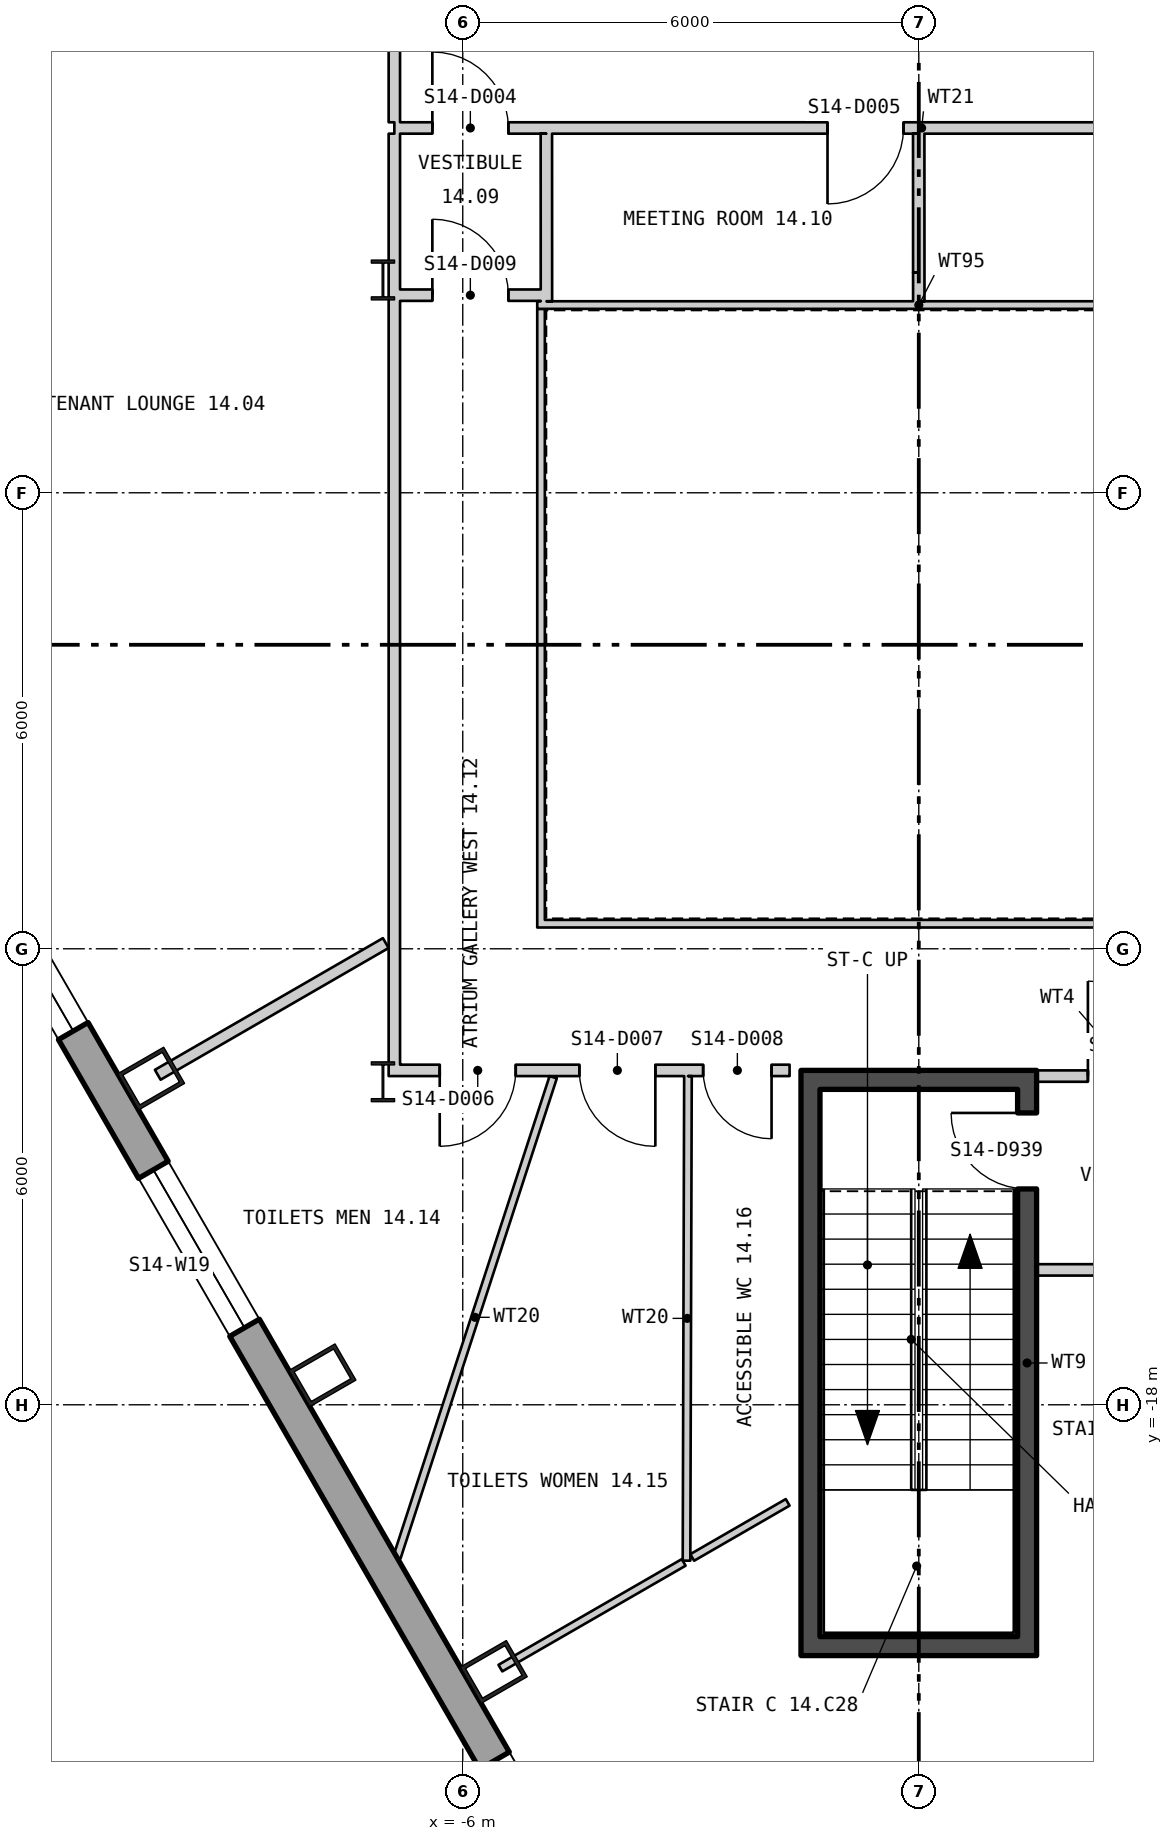
"""IFC4 building model, lengths in metres.
Left out: names, types, materials, properties, quantities, classifications, styles, units other than length and angle.
Written with IfcOpenShell. Run it as: python <this file> out.ifc"""

import sys

from ifc_helpers import new_model, si_unit, direction, frame, frame_2d, origin, origin_2d, place, context, subcontext, project, spatial, polyline, rectangle, hollow_rectangle, i_section, outline, extrude, element, fill, save


model = new_model("IFC4")
c1 = context("Model", 3, precision=1e-05, world=origin(), true_north=direction((0.0, 1.0)))
c2 = subcontext(c1, "Body", "Model", "MODEL_VIEW")
j1 = project(units=[si_unit("LENGTHUNIT", "METRE"), si_unit("PLANEANGLEUNIT", "RADIAN")], contexts=[c1])
p1 = place(None, origin())
s1 = spatial("IfcSite", under=j1, at=p1, CompositionType="ELEMENT")
p2 = place(p1, origin())
s2 = spatial("IfcBuilding", under=s1, at=p2, CompositionType="ELEMENT")
p3 = place(p2, frame((0.0, 0.0, 192.6)))
s3 = spatial("IfcBuildingStorey", under=s2, at=p3, CompositionType="ELEMENT", Elevation=192.6)
for number, where, z_axis, x_axis in (
    (1, (-10.1, -13.708, 0.0), (0.0, 0.0, 1.0), (0.5, -0.866, 0.0)),
    (2, (-7.846, -17.612, 0.0), (0.0, 0.0, 1.0), (0.5, -0.866, 0.0)),
    (3, (-5.592, -21.515, 0.0), (0.0, 0.0, 1.0), (0.5, -0.866, 0.0)),
):
    element("IfcColumn", number, at=place(p3, frame(where, z_axis=z_axis, x_axis=x_axis)), inside=s3, PredefinedType="COLUMN", context=c2, shape_type="SweptSolid", body=[
        extrude(hollow_rectangle(XDim=0.55, YDim=0.7, WallThickness=0.05, at=origin_2d()), origin(), (0.0, 0.0, 1.0), 3.9),
    ])
for number, where, z_axis, x_axis in (
    (4, (-7.05, -3.2, 0.0), (0.0, 0.0, 1.0), (1.0, 0.0, 0.0)),
    (5, (-7.05, -13.75, 0.0), (0.0, 0.0, 1.0), (1.0, 0.0, 0.0)),
):
    element("IfcColumn", number, at=place(p3, frame(where, z_axis=z_axis, x_axis=x_axis)), inside=s3, PredefinedType="COLUMN", context=c2, shape_type="SweptSolid", body=[
        extrude(i_section(OverallWidth=0.306, OverallDepth=0.524, WebThickness=0.021, FlangeThickness=0.04, at=origin_2d()), origin(), (0.0, 0.0, 1.0), 3.9),
    ])
p4 = place(p3, frame((-26.54, 13.618, -0.18), z_axis=(0.0, 0.0, 1.0), x_axis=(0.499999764979, -0.866025539474, 0.0)))
e6 = element("IfcWall", 6, at=p4, inside=s3, PredefinedType="SOLIDWALL", context=c2, shape_type="SweptSolid", body=[
    extrude(outline(polyline([(-0.13, -0.225), (45.87, -0.225), (45.61, 0.225), (0.13, 0.225), (-0.13, -0.225)])), origin(), (0.0, 0.0, 1.0), 3.68),
])
p5 = place(p4, frame((1.424, 0.0, 1.08)))
e7 = element("IfcOpeningElement", 7, at=p5, cuts=e6, PredefinedType="OPENING", context=c2, shape_type="SweptSolid", body=[
    extrude(rectangle(XDim=2.4, YDim=2.0, at=frame_2d((1.2, 1.0))), frame((0.0, 0.235, 0.0), z_axis=(0.0, -1.0, 0.0), x_axis=(1.0, 0.0, 0.0)), (0.0, 0.0, 1.0), 0.47),
])
p6 = place(p4, frame((5.893, 0.0, 1.08)))
e8 = element("IfcOpeningElement", 8, at=p6, cuts=e6, PredefinedType="OPENING", context=c2, shape_type="SweptSolid", body=[
    extrude(rectangle(XDim=2.4, YDim=2.0, at=frame_2d((1.2, 1.0))), frame((0.0, 0.235, 0.0), z_axis=(0.0, -1.0, 0.0), x_axis=(1.0, 0.0, 0.0)), (0.0, 0.0, 1.0), 0.47),
])
p7 = place(p4, frame((10.401, 0.0, 1.08)))
e9 = element("IfcOpeningElement", 9, at=p7, cuts=e6, PredefinedType="OPENING", context=c2, shape_type="SweptSolid", body=[
    extrude(rectangle(XDim=2.4, YDim=2.0, at=frame_2d((1.2, 1.0))), frame((0.0, 0.235, 0.0), z_axis=(0.0, -1.0, 0.0), x_axis=(1.0, 0.0, 0.0)), (0.0, 0.0, 1.0), 0.47),
])
p8 = place(p4, frame((14.909, 0.0, 1.08)))
e10 = element("IfcOpeningElement", 10, at=p8, cuts=e6, PredefinedType="OPENING", context=c2, shape_type="SweptSolid", body=[
    extrude(rectangle(XDim=2.4, YDim=2.0, at=frame_2d((1.2, 1.0))), frame((0.0, 0.235, 0.0), z_axis=(0.0, -1.0, 0.0), x_axis=(1.0, 0.0, 0.0)), (0.0, 0.0, 1.0), 0.47),
])
p9 = place(p4, frame((19.416, 0.0, 1.08)))
e11 = element("IfcOpeningElement", 11, at=p9, cuts=e6, PredefinedType="OPENING", context=c2, shape_type="SweptSolid", body=[
    extrude(rectangle(XDim=2.4, YDim=2.0, at=frame_2d((1.2, 1.0))), frame((0.0, 0.235, 0.0), z_axis=(0.0, -1.0, 0.0), x_axis=(1.0, 0.0, 0.0)), (0.0, 0.0, 1.0), 0.47),
])
p10 = place(p4, frame((23.924, 0.0, 1.08)))
e12 = element("IfcOpeningElement", 12, at=p10, cuts=e6, PredefinedType="OPENING", context=c2, shape_type="SweptSolid", body=[
    extrude(rectangle(XDim=2.4, YDim=2.0, at=frame_2d((1.2, 1.0))), frame((0.0, 0.235, 0.0), z_axis=(0.0, -1.0, 0.0), x_axis=(1.0, 0.0, 0.0)), (0.0, 0.0, 1.0), 0.47),
])
p11 = place(p4, frame((28.431, 0.0, 1.08)))
e13 = element("IfcOpeningElement", 13, at=p11, cuts=e6, PredefinedType="OPENING", context=c2, shape_type="SweptSolid", body=[
    extrude(rectangle(XDim=2.4, YDim=2.0, at=frame_2d((1.2, 1.0))), frame((0.0, 0.235, 0.0), z_axis=(0.0, -1.0, 0.0), x_axis=(1.0, 0.0, 0.0)), (0.0, 0.0, 1.0), 0.47),
])
p12 = place(p4, frame((32.939, 0.0, 1.08)))
e14 = element("IfcOpeningElement", 14, at=p12, cuts=e6, PredefinedType="OPENING", context=c2, shape_type="SweptSolid", body=[
    extrude(rectangle(XDim=2.4, YDim=2.0, at=frame_2d((1.2, 1.0))), frame((0.0, 0.235, 0.0), z_axis=(0.0, -1.0, 0.0), x_axis=(1.0, 0.0, 0.0)), (0.0, 0.0, 1.0), 0.47),
])
p13 = place(p4, frame((41.916, 0.0, 1.08)))
e15 = element("IfcOpeningElement", 15, at=p13, cuts=e6, PredefinedType="OPENING", context=c2, shape_type="SweptSolid", body=[
    extrude(rectangle(XDim=2.4, YDim=2.0, at=frame_2d((1.2, 1.0))), frame((0.0, 0.235, 0.0), z_axis=(0.0, -1.0, 0.0), x_axis=(1.0, 0.0, 0.0)), (0.0, 0.0, 1.0), 0.47),
])
for number, where, z_axis, x_axis in (
    (16, (-5.02, -11.67, 0.0), (0.0, 0.0, 1.0), (1.0, 0.0, 0.0)),
    (17, (5.02, -3.53, 0.0), (0.0, 0.0, 1.0), (-1.0, 0.0, 0.0)),
):
    element("IfcWall", number, at=place(p3, frame(where, z_axis=z_axis, x_axis=x_axis)), inside=s3, PredefinedType="PARTITIONING", context=c2, shape_type="SweptSolid", body=[
        extrude(rectangle(XDim=10.04, YDim=0.1, at=frame_2d((5.02, 0.0))), origin(), (0.0, 0.0, 1.0), 3.7),
    ])
p14 = place(p3, frame((-4.97, -3.58, 0.0), z_axis=(0.0, 0.0, 1.0), x_axis=(0.0, -1.0, 0.0)))
e18 = element("IfcWall", 18, at=p14, inside=s3, PredefinedType="PARTITIONING", context=c2, shape_type="SweptSolid", body=[
    extrude(rectangle(XDim=8.04, YDim=0.1, at=frame_2d((4.02, 0.0))), origin(), (0.0, 0.0, 1.0), 3.7),
])
p15 = place(p3, frame((-1.425, -21.05, 0.0), z_axis=(0.0, 0.0, 1.0), x_axis=(0.0, 1.0, 0.0)))
e19 = element("IfcWall", 19, at=p15, inside=s3, PredefinedType="SHEAR", context=c2, shape_type="SweptSolid", body=[
    extrude(rectangle(XDim=7.2, YDim=0.25, at=frame_2d((3.6, 0.0))), origin(), (0.0, 0.0, 1.0), 3.7),
])
p16 = place(p3, frame((1.425, -21.05, 0.0), z_axis=(0.0, 0.0, 1.0), x_axis=(0.0, 1.0, 0.0)))
e20 = element("IfcWall", 20, at=p16, inside=s3, PredefinedType="SHEAR", context=c2, shape_type="SweptSolid", body=[
    extrude(rectangle(XDim=7.2, YDim=0.25, at=frame_2d((3.6, 0.0))), origin(), (0.0, 0.0, 1.0), 3.7),
])
p17 = place(p16, frame((5.89, 0.0, 0.0)))
e21 = element("IfcOpeningElement", 21, at=p17, cuts=e20, PredefinedType="OPENING", context=c2, shape_type="SweptSolid", body=[
    extrude(rectangle(XDim=1.0, YDim=2.1, at=frame_2d((0.5, 1.05))), frame((0.0, 0.135, 0.0), z_axis=(0.0, -1.0, 0.0), x_axis=(1.0, 0.0, 0.0)), (0.0, 0.0, 1.0), 0.27),
])
for number, where, z_axis, x_axis in (
    (22, (-1.55, -21.175, 0.0), (0.0, 0.0, 1.0), (1.0, 0.0, 0.0)),
    (23, (-1.55, -13.725, 0.0), (0.0, 0.0, 1.0), (1.0, 0.0, 0.0)),
):
    element("IfcWall", number, at=place(p3, frame(where, z_axis=z_axis, x_axis=x_axis)), inside=s3, PredefinedType="SHEAR", context=c2, shape_type="SweptSolid", body=[
        extrude(rectangle(XDim=3.1, YDim=0.25, at=frame_2d((1.55, 0.0))), origin(), (0.0, 0.0, 1.0), 3.7),
    ])
p18 = place(p3, frame((1.55, -16.225, 0.0), z_axis=(0.0, 0.0, 1.0), x_axis=(1.0, 0.0, 0.0)))
e24 = element("IfcWall", 24, at=p18, inside=s3, PredefinedType="PARTITIONING", context=c2, shape_type="SweptSolid", body=[
    extrude(rectangle(XDim=2.6, YDim=0.15, at=frame_2d((1.3, 0.0))), origin(), (0.0, 0.0, 1.0), 3.7),
])
p19 = place(p3, frame((1.55, -13.675, 0.0), z_axis=(0.0, 0.0, 1.0), x_axis=(1.0, 0.0, 0.0)))
e25 = element("IfcWall", 25, at=p19, inside=s3, PredefinedType="PARTITIONING", context=c2, shape_type="SweptSolid", body=[
    extrude(rectangle(XDim=2.6, YDim=0.15, at=frame_2d((1.3, 0.0))), origin(), (0.0, 0.0, 1.0), 2.91),
])
p20 = place(p19, frame((0.675, 0.0, 0.0)))
e26 = element("IfcOpeningElement", 26, at=p20, cuts=e25, PredefinedType="OPENING", context=c2, shape_type="SweptSolid", body=[
    extrude(rectangle(XDim=1.25, YDim=2.1, at=frame_2d((0.625, 1.05))), frame((0.0, 0.085, 0.0), z_axis=(0.0, -1.0, 0.0), x_axis=(1.0, 0.0, 0.0)), (0.0, 0.0, 1.0), 0.17),
])
p21 = place(p3, frame((-10.013, -13.658, 0.0), z_axis=(0.0, 0.0, 1.0), x_axis=(0.865906746611, 0.500205463959, 0.0)))
e27 = element("IfcWall", 27, at=p21, inside=s3, PredefinedType="PARTITIONING", context=c2, shape_type="SweptSolid", body=[
    extrude(rectangle(XDim=3.465, YDim=0.15, at=frame_2d((1.732, 0.0))), origin(), (0.0, 0.0, 1.0), 3.7),
])
p22 = place(p3, frame((-6.9, -13.675, 0.0), z_axis=(0.0, 0.0, 1.0), x_axis=(0.0, 1.0, 0.0)))
e28 = element("IfcWall", 28, at=p22, inside=s3, PredefinedType="PARTITIONING", context=c2, shape_type="SweptSolid", body=[
    extrude(rectangle(XDim=10.263, YDim=0.15, at=frame_2d((5.131, 0.0))), origin(), (0.0, 0.0, 1.0), 3.11),
])
p23 = place(p3, frame((-6.9, -3.412, 0.0), z_axis=(0.0, 0.0, 1.0), x_axis=(0.0, 1.0, 0.0)))
e29 = element("IfcWall", 29, at=p23, inside=s3, PredefinedType="PARTITIONING", context=c2, shape_type="SweptSolid", body=[
    extrude(rectangle(XDim=2.137, YDim=0.15, at=frame_2d((1.069, 0.0))), origin(), (0.0, 0.0, 1.0), 3.7),
])
p24 = place(p3, frame((-6.9, -1.2, 0.0), z_axis=(0.0, 0.0, 1.0), x_axis=(1.0, 0.0, 0.0)))
e30 = element("IfcWall", 30, at=p24, inside=s3, PredefinedType="PARTITIONING", context=c2, shape_type="SweptSolid", body=[
    extrude(rectangle(XDim=13.875, YDim=0.15, at=frame_2d((6.938, 0.0))), origin(), (0.0, 0.0, 1.0), 3.7),
])
p25 = place(p24, frame((0.5, 0.0, 0.0)))
e31 = element("IfcOpeningElement", 31, at=p25, cuts=e30, PredefinedType="OPENING", context=c2, shape_type="SweptSolid", body=[
    extrude(rectangle(XDim=1.0, YDim=2.1, at=frame_2d((0.5, 1.05))), frame((0.0, 0.085, 0.0), z_axis=(0.0, -1.0, 0.0), x_axis=(1.0, 0.0, 0.0)), (0.0, 0.0, 1.0), 0.17),
])
p26 = place(p24, frame((5.699, 0.0, 0.0)))
e32 = element("IfcOpeningElement", 32, at=p26, cuts=e30, PredefinedType="OPENING", context=c2, shape_type="SweptSolid", body=[
    extrude(rectangle(XDim=1.0, YDim=2.1, at=frame_2d((0.5, 1.05))), frame((0.0, 0.085, 0.0), z_axis=(0.0, -1.0, 0.0), x_axis=(1.0, 0.0, 0.0)), (0.0, 0.0, 1.0), 0.17),
])
p27 = place(p3, frame((-6.9, -1.125, 0.0), z_axis=(0.0, 0.0, 1.0), x_axis=(0.0, 1.0, 0.0)))
e33 = element("IfcWall", 33, at=p27, inside=s3, PredefinedType="PARTITIONING", context=c2, shape_type="SweptSolid", body=[
    extrude(rectangle(XDim=1.321, YDim=0.15, at=frame_2d((0.66, 0.0))), origin(), (0.0, 0.0, 1.0), 3.7),
])
p28 = place(p3, frame((-6.866, -20.008, 0.0), z_axis=(0.0, 0.0, 1.0), x_axis=(0.309446795586, 0.95091675803, 0.0)))
e34 = element("IfcWall", 34, at=p28, inside=s3, PredefinedType="PARTITIONING", context=c2, shape_type="SweptSolid", body=[
    extrude(rectangle(XDim=6.644, YDim=0.1, at=frame_2d((3.322, 0.0))), origin(), (0.0, 0.0, 1.0), 3.7),
])
p29 = place(p3, frame((-6.825, -13.6, 0.0), z_axis=(0.0, 0.0, 1.0), x_axis=(1.0, 0.0, 0.0)))
e35 = element("IfcWall", 35, at=p29, inside=s3, PredefinedType="PARTITIONING", context=c2, shape_type="SweptSolid", body=[
    extrude(rectangle(XDim=5.125, YDim=0.15, at=frame_2d((2.562, 0.0))), origin(), (0.0, 0.0, 1.0), 2.91),
])
p30 = place(p29, frame((0.522, 0.0, 0.0)))
e36 = element("IfcOpeningElement", 36, at=p30, cuts=e35, PredefinedType="OPENING", context=c2, shape_type="SweptSolid", body=[
    extrude(rectangle(XDim=1.0, YDim=2.1, at=frame_2d((0.5, 1.05))), frame((0.0, 0.085, 0.0), z_axis=(0.0, -1.0, 0.0), x_axis=(1.0, 0.0, 0.0)), (0.0, 0.0, 1.0), 0.17),
])
p31 = place(p29, frame((2.359, 0.0, 0.0)))
e37 = element("IfcOpeningElement", 37, at=p31, cuts=e35, PredefinedType="OPENING", context=c2, shape_type="SweptSolid", body=[
    extrude(rectangle(XDim=1.0, YDim=2.1, at=frame_2d((0.5, 1.05))), frame((0.0, 0.085, 0.0), z_axis=(0.0, -1.0, 0.0), x_axis=(1.0, 0.0, 0.0)), (0.0, 0.0, 1.0), 0.17),
])
p32 = place(p29, frame((3.988, 0.0, 0.0)))
e38 = element("IfcOpeningElement", 38, at=p32, cuts=e35, PredefinedType="OPENING", context=c2, shape_type="SweptSolid", body=[
    extrude(rectangle(XDim=0.9, YDim=2.1, at=frame_2d((0.45, 1.05))), frame((0.0, 0.085, 0.0), z_axis=(0.0, -1.0, 0.0), x_axis=(1.0, 0.0, 0.0)), (0.0, 0.0, 1.0), 0.17),
])
p33 = place(p3, frame((-6.825, -3.4, 0.0), z_axis=(0.0, 0.0, 1.0), x_axis=(1.0, 0.0, 0.0)))
e39 = element("IfcWall", 39, at=p33, inside=s3, PredefinedType="PARTITIONING", context=c2, shape_type="SweptSolid", body=[
    extrude(rectangle(XDim=1.851, YDim=0.15, at=frame_2d((0.925, 0.0))), origin(), (0.0, 0.0, 1.0), 3.7),
])
p34 = place(p33, frame((0.425, 0.0, 0.0)))
e40 = element("IfcOpeningElement", 40, at=p34, cuts=e39, PredefinedType="OPENING", context=c2, shape_type="SweptSolid", body=[
    extrude(rectangle(XDim=1.0, YDim=2.1, at=frame_2d((0.5, 1.05))), frame((0.0, 0.085, 0.0), z_axis=(0.0, -1.0, 0.0), x_axis=(1.0, 0.0, 0.0)), (0.0, 0.0, 1.0), 0.17),
])
p35 = place(p3, frame((-5.505, -21.465, 0.0), z_axis=(0.0, 0.0, 1.0), x_axis=(0.866269282503, 0.49957735156, 0.0)))
e41 = element("IfcWall", 41, at=p35, inside=s3, PredefinedType="PARTITIONING", context=c2, shape_type="SweptSolid", body=[
    extrude(rectangle(XDim=2.784, YDim=0.1, at=frame_2d((1.392, 0.0))), origin(), (0.0, 0.0, 1.0), 3.7),
])
p36 = place(p3, frame((-4.899, -3.48, 0.0), z_axis=(0.0, 0.0, 1.0), x_axis=(-0.000453514693, 0.999999897162, 0.0)))
e42 = element("IfcWall", 42, at=p36, inside=s3, PredefinedType="PARTITIONING", context=c2, shape_type="SweptSolid", body=[
    extrude(rectangle(XDim=2.205, YDim=0.15, at=frame_2d((1.103, 0.0))), origin(), (0.0, 0.0, 1.0), 3.7),
])
p37 = place(p3, frame((-3.056, -20.051, 0.0), z_axis=(0.0, 0.0, 1.0), x_axis=(0.002979911487, 0.999995560054, 0.0)))
e43 = element("IfcWall", 43, at=p37, inside=s3, PredefinedType="PARTITIONING", context=c2, shape_type="SweptSolid", body=[
    extrude(rectangle(XDim=6.376, YDim=0.1, at=frame_2d((3.188, 0.0))), origin(), (0.0, 0.0, 1.0), 3.01),
])
p38 = place(p3, frame((-2.981, -20.009, 0.0), z_axis=(0.0, 0.0, 1.0), x_axis=(0.866070766281, 0.499921421619, 0.0)))
e44 = element("IfcWall", 44, at=p38, inside=s3, PredefinedType="PARTITIONING", context=c2, shape_type="SweptSolid", body=[
    extrude(rectangle(XDim=1.45, YDim=0.1, at=frame_2d((0.725, 0.0))), origin(), (0.0, 0.0, 1.0), 3.7),
])
p39 = place(p3, frame((-0.001, -1.275, 0.0), z_axis=(0.0, 0.0, 1.0), x_axis=(0.000438356122, -0.999999903922, 0.0)))
e45 = element("IfcWall", 45, at=p39, inside=s3, PredefinedType="PARTITIONING", context=c2, shape_type="SweptSolid", body=[
    extrude(rectangle(XDim=1.825, YDim=0.15, at=frame_2d((0.912, 0.0))), origin(), (0.0, 0.0, 1.0), 3.15),
])
p40 = place(p3, frame((-0.0, -3.1, 0.0), z_axis=(0.0, 0.0, 1.0), x_axis=(0.000526315717, -0.999999861496, 0.0)))
e46 = element("IfcWall", 46, at=p40, inside=s3, PredefinedType="PARTITIONING", context=c2, shape_type="SweptSolid", body=[
    extrude(rectangle(XDim=0.38, YDim=0.15, at=frame_2d((0.19, 0.0))), origin(), (0.0, 0.0, 1.0), 3.7),
])
p41 = place(p11, origin())
e47 = element("IfcWindow", 47, at=p41, inside=s3, PartitioningType="SINGLE_PANEL", PredefinedType="WINDOW", context=c2, shape_type="SweptSolid", body=[
    extrude(rectangle(XDim=2.4, YDim=2.0, at=frame_2d((1.2, 1.0))), frame((0.0, 0.105, 0.0), z_axis=(0.0, -1.0, 0.0), x_axis=(1.0, 0.0, 0.0)), (0.0, 0.0, 1.0), 0.06),
])
fill(e13, e47)
p42 = place(p12, origin())
e48 = element("IfcWindow", 48, at=p42, inside=s3, PartitioningType="SINGLE_PANEL", PredefinedType="WINDOW", context=c2, shape_type="SweptSolid", body=[
    extrude(rectangle(XDim=2.4, YDim=2.0, at=frame_2d((1.2, 1.0))), frame((0.0, 0.105, 0.0), z_axis=(0.0, -1.0, 0.0), x_axis=(1.0, 0.0, 0.0)), (0.0, 0.0, 1.0), 0.06),
])
fill(e14, e48)
p43 = place(p13, origin())
e49 = element("IfcWindow", 49, at=p43, inside=s3, PartitioningType="SINGLE_PANEL", PredefinedType="WINDOW", context=c2, shape_type="SweptSolid", body=[
    extrude(rectangle(XDim=2.4, YDim=2.0, at=frame_2d((1.2, 1.0))), frame((0.0, 0.105, 0.0), z_axis=(0.0, -1.0, 0.0), x_axis=(1.0, 0.0, 0.0)), (0.0, 0.0, 1.0), 0.06),
])
fill(e15, e49)
p44 = place(p17, origin())
e50 = element("IfcDoor", 50, at=p44, inside=s3, OperationType="SINGLE_SWING_LEFT", PredefinedType="DOOR", context=c2, shape_type="SweptSolid", body=[
    extrude(rectangle(XDim=1.0, YDim=2.1, at=frame_2d((0.5, 1.05))), frame((0.0, 0.025, 0.0), z_axis=(0.0, -1.0, 0.0), x_axis=(1.0, 0.0, 0.0)), (0.0, 0.0, 1.0), 0.05),
])
fill(e21, e50)
p45 = place(p20, origin())
e51 = element("IfcDoor", 51, at=p45, inside=s3, OperationType="SINGLE_SWING_RIGHT", PredefinedType="DOOR", context=c2, shape_type="SweptSolid", body=[
    extrude(rectangle(XDim=1.25, YDim=2.1, at=frame_2d((0.625, 1.05))), frame((0.0, 0.025, 0.0), z_axis=(0.0, -1.0, 0.0), x_axis=(1.0, 0.0, 0.0)), (0.0, 0.0, 1.0), 0.05),
])
fill(e26, e51)
p46 = place(p25, origin())
e52 = element("IfcDoor", 52, at=p46, inside=s3, OperationType="SINGLE_SWING_RIGHT", PredefinedType="DOOR", context=c2, shape_type="SweptSolid", body=[
    extrude(rectangle(XDim=1.0, YDim=2.1, at=frame_2d((0.5, 1.05))), frame((0.0, 0.025, 0.0), z_axis=(0.0, -1.0, 0.0), x_axis=(1.0, 0.0, 0.0)), (0.0, 0.0, 1.0), 0.05),
])
fill(e31, e52)
p47 = place(p26, origin())
e53 = element("IfcDoor", 53, at=p47, inside=s3, OperationType="SINGLE_SWING_LEFT", PredefinedType="DOOR", context=c2, shape_type="SweptSolid", body=[
    extrude(rectangle(XDim=1.0, YDim=2.1, at=frame_2d((0.5, 1.05))), frame((0.0, 0.025, 0.0), z_axis=(0.0, -1.0, 0.0), x_axis=(1.0, 0.0, 0.0)), (0.0, 0.0, 1.0), 0.05),
])
fill(e32, e53)
p48 = place(p30, origin())
e54 = element("IfcDoor", 54, at=p48, inside=s3, OperationType="SINGLE_SWING_LEFT", PredefinedType="DOOR", context=c2, shape_type="SweptSolid", body=[
    extrude(rectangle(XDim=1.0, YDim=2.1, at=frame_2d((0.5, 1.05))), frame((0.0, 0.025, 0.0), z_axis=(0.0, -1.0, 0.0), x_axis=(1.0, 0.0, 0.0)), (0.0, 0.0, 1.0), 0.05),
])
fill(e36, e54)
p49 = place(p31, origin())
e55 = element("IfcDoor", 55, at=p49, inside=s3, OperationType="SINGLE_SWING_RIGHT", PredefinedType="DOOR", context=c2, shape_type="SweptSolid", body=[
    extrude(rectangle(XDim=1.0, YDim=2.1, at=frame_2d((0.5, 1.05))), frame((0.0, 0.025, 0.0), z_axis=(0.0, -1.0, 0.0), x_axis=(1.0, 0.0, 0.0)), (0.0, 0.0, 1.0), 0.05),
])
fill(e37, e55)
p50 = place(p32, origin())
e56 = element("IfcDoor", 56, at=p50, inside=s3, OperationType="SINGLE_SWING_RIGHT", PredefinedType="DOOR", context=c2, shape_type="SweptSolid", body=[
    extrude(rectangle(XDim=0.9, YDim=2.1, at=frame_2d((0.45, 1.05))), frame((0.0, 0.025, 0.0), z_axis=(0.0, -1.0, 0.0), x_axis=(1.0, 0.0, 0.0)), (0.0, 0.0, 1.0), 0.05),
])
fill(e38, e56)
p51 = place(p34, origin())
e57 = element("IfcDoor", 57, at=p51, inside=s3, OperationType="SINGLE_SWING_RIGHT", PredefinedType="DOOR", context=c2, shape_type="SweptSolid", body=[
    extrude(rectangle(XDim=1.0, YDim=2.1, at=frame_2d((0.5, 1.05))), frame((0.0, 0.025, 0.0), z_axis=(0.0, -1.0, 0.0), x_axis=(1.0, 0.0, 0.0)), (0.0, 0.0, 1.0), 0.05),
])
fill(e40, e57)
save(model, sys.argv[1])
